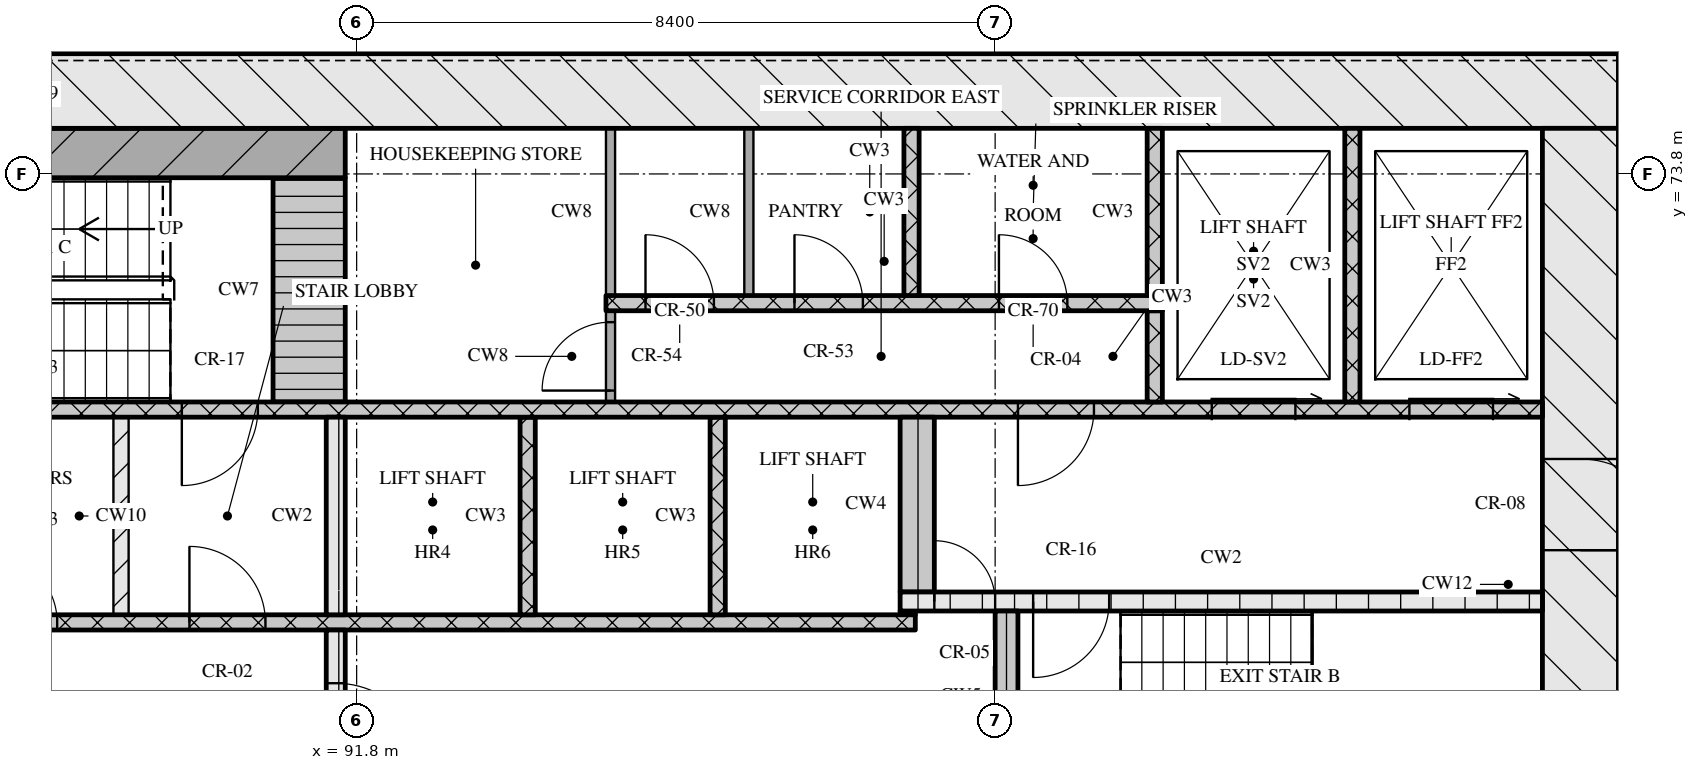
"""IFC4 building model, lengths in metres.
Left out: names, types, materials, properties, quantities, classifications, styles, units other than length and angle.
Written with IfcOpenShell. Run it as: python <this file> out.ifc"""

import sys

from ifc_helpers import new_model, si_unit, direction, frame, frame_2d, origin, place, context, subcontext, project, spatial, rectangle, extrude, element, fill, save


model = new_model("IFC4")
c1 = context("Model", 3, precision=1e-05, world=origin(), true_north=direction((0.0, 1.0)))
c2 = subcontext(c1, "Body", "Model", "MODEL_VIEW")
j1 = project(units=[si_unit("LENGTHUNIT", "METRE"), si_unit("PLANEANGLEUNIT", "RADIAN")], contexts=[c1])
p1 = place(None, origin())
s1 = spatial("IfcSite", under=j1, at=p1, CompositionType="ELEMENT")
p2 = place(p1, origin())
s2 = spatial("IfcBuilding", under=s1, at=p2, CompositionType="ELEMENT")
p3 = place(p2, frame((0.0, 0.0, 116.85)))
s3 = spatial("IfcBuildingStorey", under=s2, at=p3, CompositionType="ELEMENT", Elevation=116.85)
p4 = place(p3, frame((66.8, 74.9, 0.0), z_axis=(0.0, 0.0, 1.0), x_axis=(1.0, 0.0, 0.0)))
e1 = element("IfcWall", 1, at=p4, inside=s3, PredefinedType="SOLIDWALL", context=c2, shape_type="SweptSolid", body=[
    extrude(rectangle(XDim=41.6, YDim=1.0, at=frame_2d((20.8, 0.0))), origin(), (0.0, 0.0, 1.0), 3.32),
])
p5 = place(p3, frame((107.9, 62.4, 0.0), z_axis=(0.0, 0.0, 1.0), x_axis=(0.0, 1.0, 0.0)))
e2 = element("IfcWall", 2, at=p5, inside=s3, PredefinedType="SOLIDWALL", context=c2, shape_type="SweptSolid", body=[
    extrude(rectangle(XDim=12.0, YDim=1.0, at=frame_2d((6.0, 0.0))), origin(), (0.0, 0.0, 1.0), 3.32),
])
p6 = place(p5, frame((6.45, 0.0, 0.0)))
e3 = element("IfcOpeningElement", 3, at=p6, cuts=e2, PredefinedType="OPENING", context=c2, shape_type="SweptSolid", body=[
    extrude(rectangle(XDim=1.2, YDim=2.1, at=frame_2d((0.6, 1.05))), frame((0.0, 0.51, 0.0), z_axis=(0.0, -1.0, 0.0), x_axis=(1.0, 0.0, 0.0)), (0.0, 0.0, 1.0), 1.02),
])
p7 = place(p3, frame((91.525, 65.2, 0.0), z_axis=(0.0, 0.0, 1.0), x_axis=(0.0, 1.0, 0.0)))
e4 = element("IfcWall", 4, at=p7, inside=s3, PredefinedType="SOLIDWALL", context=c2, shape_type="SweptSolid", body=[
    extrude(rectangle(XDim=2.6, YDim=0.25, at=frame_2d((1.3, 0.0))), origin(), (0.0, 0.0, 1.0), 3.32),
])
p8 = place(p7, frame((0.7, 0.0, 0.0)))
e5 = element("IfcOpeningElement", 5, at=p8, cuts=e4, PredefinedType="OPENING", context=c2, shape_type="SweptSolid", body=[
    extrude(rectangle(XDim=1.2, YDim=2.1, at=frame_2d((0.6, 1.05))), frame((0.0, 0.135, 0.0), z_axis=(0.0, -1.0, 0.0), x_axis=(1.0, 0.0, 0.0)), (0.0, 0.0, 1.0), 0.27),
])
p9 = place(p3, frame((100.35, 65.2, 0.0), z_axis=(0.0, 0.0, 1.0), x_axis=(0.0, 1.0, 0.0)))
e6 = element("IfcWall", 6, at=p9, inside=s3, PredefinedType="SOLIDWALL", context=c2, shape_type="SweptSolid", body=[
    extrude(rectangle(XDim=2.85, YDim=0.3, at=frame_2d((1.425, 0.0))), origin(), (0.0, 0.0, 1.0), 3.32),
])
p10 = place(p3, frame((76.05, 67.9, 0.0), z_axis=(0.0, 0.0, 1.0), x_axis=(1.0, 0.0, 0.0)))
e7 = element("IfcWall", 7, at=p10, inside=s3, PredefinedType="SOLIDWALL", context=c2, shape_type="SweptSolid", body=[
    extrude(rectangle(XDim=23.1, YDim=0.2, at=frame_2d((11.55, 0.0))), origin(), (0.0, 0.0, 1.0), 3.32),
])
p11 = place(p10, frame((0.6, 0.0, 0.0)))
e8 = element("IfcOpeningElement", 8, at=p11, cuts=e7, PredefinedType="OPENING", context=c2, shape_type="SweptSolid", body=[
    extrude(rectangle(XDim=1.1, YDim=2.1, at=frame_2d((0.55, 1.05))), frame((0.0, 0.11, 0.0), z_axis=(0.0, -1.0, 0.0), x_axis=(1.0, 0.0, 0.0)), (0.0, 0.0, 1.0), 0.22),
])
p12 = place(p10, frame((3.1, 0.0, 0.0)))
e9 = element("IfcOpeningElement", 9, at=p12, cuts=e7, PredefinedType="OPENING", context=c2, shape_type="SweptSolid", body=[
    extrude(rectangle(XDim=1.1, YDim=2.1, at=frame_2d((0.55, 1.05))), frame((0.0, 0.11, 0.0), z_axis=(0.0, -1.0, 0.0), x_axis=(1.0, 0.0, 0.0)), (0.0, 0.0, 1.0), 0.22),
])
p13 = place(p10, frame((5.6, 0.0, 0.0)))
e10 = element("IfcOpeningElement", 10, at=p13, cuts=e7, PredefinedType="OPENING", context=c2, shape_type="SweptSolid", body=[
    extrude(rectangle(XDim=1.1, YDim=2.1, at=frame_2d((0.55, 1.05))), frame((0.0, 0.11, 0.0), z_axis=(0.0, -1.0, 0.0), x_axis=(1.0, 0.0, 0.0)), (0.0, 0.0, 1.0), 0.22),
])
p14 = place(p10, frame((8.45, 0.0, 0.0)))
e11 = element("IfcOpeningElement", 11, at=p14, cuts=e7, PredefinedType="OPENING", context=c2, shape_type="SweptSolid", body=[
    extrude(rectangle(XDim=0.9, YDim=2.1, at=frame_2d((0.45, 1.05))), frame((0.0, 0.11, 0.0), z_axis=(0.0, -1.0, 0.0), x_axis=(1.0, 0.0, 0.0)), (0.0, 0.0, 1.0), 0.22),
])
p15 = place(p10, frame((10.91, 0.0, 0.0)))
e12 = element("IfcOpeningElement", 12, at=p15, cuts=e7, PredefinedType="OPENING", context=c2, shape_type="SweptSolid", body=[
    extrude(rectangle(XDim=0.9, YDim=2.1, at=frame_2d((0.45, 1.05))), frame((0.0, 0.11, 0.0), z_axis=(0.0, -1.0, 0.0), x_axis=(1.0, 0.0, 0.0)), (0.0, 0.0, 1.0), 0.22),
])
p16 = place(p10, frame((13.55, 0.0, 0.0)))
e13 = element("IfcOpeningElement", 13, at=p16, cuts=e7, PredefinedType="OPENING", context=c2, shape_type="SweptSolid", body=[
    extrude(rectangle(XDim=1.0, YDim=2.1, at=frame_2d((0.5, 1.05))), frame((0.0, 0.11, 0.0), z_axis=(0.0, -1.0, 0.0), x_axis=(1.0, 0.0, 0.0)), (0.0, 0.0, 1.0), 0.22),
])
p17 = place(p3, frame((88.7, 68.0, 0.0), z_axis=(0.0, 0.0, 1.0), x_axis=(0.0, 1.0, 0.0)))
e14 = element("IfcWall", 14, at=p17, inside=s3, PredefinedType="PARTITIONING", context=c2, shape_type="SweptSolid", body=[
    extrude(rectangle(XDim=2.6, YDim=0.2, at=frame_2d((1.3, 0.0))), origin(), (0.0, 0.0, 1.0), 3.32),
])
p18 = place(p3, frame((91.525, 68.0, 0.0), z_axis=(0.0, 0.0, 1.0), x_axis=(0.0, 1.0, 0.0)))
e15 = element("IfcWall", 15, at=p18, inside=s3, PredefinedType="SOLIDWALL", context=c2, shape_type="SweptSolid", body=[
    extrude(rectangle(XDim=2.6, YDim=0.25, at=frame_2d((1.3, 0.0))), origin(), (0.0, 0.0, 1.0), 3.32),
])
for number, where, z_axis, x_axis in (
    (16, (94.05, 68.0, 0.0), (0.0, 0.0, 1.0), (0.0, 1.0, 0.0)),
    (17, (96.55, 68.0, 0.0), (0.0, 0.0, 1.0), (0.0, 1.0, 0.0)),
):
    element("IfcWall", number, at=place(p3, frame(where, z_axis=z_axis, x_axis=x_axis)), inside=s3, PredefinedType="SOLIDWALL", context=c2, shape_type="SweptSolid", body=[
        extrude(rectangle(XDim=2.6, YDim=0.2, at=frame_2d((1.3, 0.0))), origin(), (0.0, 0.0, 1.0), 3.32),
    ])
p19 = place(p3, frame((98.95, 68.025, 0.0), z_axis=(0.0, 0.0, 1.0), x_axis=(1.0, 0.0, 0.0)))
e18 = element("IfcWall", 18, at=p19, inside=s3, PredefinedType="SOLIDWALL", context=c2, shape_type="SweptSolid", body=[
    extrude(rectangle(XDim=0.2, YDim=0.05, at=frame_2d((0.1, 0.0))), origin(), (0.0, 0.0, 1.0), 3.32),
])
p20 = place(p3, frame((98.95, 68.175, 0.0), z_axis=(0.0, 0.0, 1.0), x_axis=(1.0, 0.0, 0.0)))
e19 = element("IfcWall", 19, at=p20, inside=s3, PredefinedType="SOLIDWALL", context=c2, shape_type="SweptSolid", body=[
    extrude(rectangle(XDim=8.45, YDim=0.25, at=frame_2d((4.225, 0.0))), origin(), (0.0, 0.0, 1.0), 3.32),
])
p21 = place(p20, frame((0.45, 0.0, 0.0)))
e20 = element("IfcOpeningElement", 20, at=p21, cuts=e19, PredefinedType="OPENING", context=c2, shape_type="SweptSolid", body=[
    extrude(rectangle(XDim=0.8, YDim=2.1, at=frame_2d((0.4, 1.05))), frame((0.0, 0.135, 0.0), z_axis=(0.0, -1.0, 0.0), x_axis=(1.0, 0.0, 0.0)), (0.0, 0.0, 1.0), 0.27),
])
p22 = place(p20, frame((1.75, 0.0, 0.0)))
e21 = element("IfcOpeningElement", 21, at=p22, cuts=e19, PredefinedType="OPENING", context=c2, shape_type="SweptSolid", body=[
    extrude(rectangle(XDim=1.0, YDim=2.1, at=frame_2d((0.5, 1.05))), frame((0.0, 0.135, 0.0), z_axis=(0.0, -1.0, 0.0), x_axis=(1.0, 0.0, 0.0)), (0.0, 0.0, 1.0), 0.27),
])
p23 = place(p3, frame((99.175, 68.3, 0.0), z_axis=(0.0, 0.0, 1.0), x_axis=(0.0, 1.0, 0.0)))
e22 = element("IfcWall", 22, at=p23, inside=s3, PredefinedType="SOLIDWALL", context=c2, shape_type="SweptSolid", body=[
    extrude(rectangle(XDim=2.3, YDim=0.45, at=frame_2d((1.15, 0.0))), origin(), (0.0, 0.0, 1.0), 3.32),
])
p24 = place(p3, frame((67.8, 70.7, 0.0), z_axis=(0.0, 0.0, 1.0), x_axis=(1.0, 0.0, 0.0)))
e23 = element("IfcWall", 23, at=p24, inside=s3, PredefinedType="SOLIDWALL", context=c2, shape_type="SweptSolid", body=[
    extrude(rectangle(XDim=39.6, YDim=0.2, at=frame_2d((19.8, 0.0))), origin(), (0.0, 0.0, 1.0), 3.32),
])
p25 = place(p24, frame((0.65, 0.0, 0.0)))
e24 = element("IfcOpeningElement", 24, at=p25, cuts=e23, PredefinedType="OPENING", context=c2, shape_type="SweptSolid", body=[
    extrude(rectangle(XDim=1.1, YDim=2.1, at=frame_2d((0.55, 1.05))), frame((0.0, 0.11, 0.0), z_axis=(0.0, -1.0, 0.0), x_axis=(1.0, 0.0, 0.0)), (0.0, 0.0, 1.0), 0.22),
])
p26 = place(p24, frame((3.25, 0.0, 0.0)))
e25 = element("IfcOpeningElement", 25, at=p26, cuts=e23, PredefinedType="OPENING", context=c2, shape_type="SweptSolid", body=[
    extrude(rectangle(XDim=1.1, YDim=2.1, at=frame_2d((0.55, 1.05))), frame((0.0, 0.11, 0.0), z_axis=(0.0, -1.0, 0.0), x_axis=(1.0, 0.0, 0.0)), (0.0, 0.0, 1.0), 0.22),
])
p27 = place(p24, frame((5.9, 0.0, 0.0)))
e26 = element("IfcOpeningElement", 26, at=p27, cuts=e23, PredefinedType="OPENING", context=c2, shape_type="SweptSolid", body=[
    extrude(rectangle(XDim=1.0, YDim=2.1, at=frame_2d((0.5, 1.05))), frame((0.0, 0.11, 0.0), z_axis=(0.0, -1.0, 0.0), x_axis=(1.0, 0.0, 0.0)), (0.0, 0.0, 1.0), 0.22),
])
p28 = place(p24, frame((21.7, 0.0, 0.0)))
e27 = element("IfcOpeningElement", 27, at=p28, cuts=e23, PredefinedType="OPENING", context=c2, shape_type="SweptSolid", body=[
    extrude(rectangle(XDim=1.0, YDim=2.1, at=frame_2d((0.5, 1.05))), frame((0.0, 0.11, 0.0), z_axis=(0.0, -1.0, 0.0), x_axis=(1.0, 0.0, 0.0)), (0.0, 0.0, 1.0), 0.22),
])
p29 = place(p24, frame((32.7, 0.0, 0.0)))
e28 = element("IfcOpeningElement", 28, at=p29, cuts=e23, PredefinedType="OPENING", context=c2, shape_type="SweptSolid", body=[
    extrude(rectangle(XDim=1.0, YDim=2.1, at=frame_2d((0.5, 1.05))), frame((0.0, 0.11, 0.0), z_axis=(0.0, -1.0, 0.0), x_axis=(1.0, 0.0, 0.0)), (0.0, 0.0, 1.0), 0.22),
])
p30 = place(p24, frame((35.25, 0.0, 0.0)))
e29 = element("IfcOpeningElement", 29, at=p30, cuts=e23, PredefinedType="OPENING", context=c2, shape_type="SweptSolid", body=[
    extrude(rectangle(XDim=1.1, YDim=2.1, at=frame_2d((0.55, 1.05))), frame((0.0, 0.11, 0.0), z_axis=(0.0, -1.0, 0.0), x_axis=(1.0, 0.0, 0.0)), (0.0, 0.0, 1.0), 0.22),
])
p31 = place(p24, frame((37.85, 0.0, 0.0)))
e30 = element("IfcOpeningElement", 30, at=p31, cuts=e23, PredefinedType="OPENING", context=c2, shape_type="SweptSolid", body=[
    extrude(rectangle(XDim=1.1, YDim=2.1, at=frame_2d((0.55, 1.05))), frame((0.0, 0.11, 0.0), z_axis=(0.0, -1.0, 0.0), x_axis=(1.0, 0.0, 0.0)), (0.0, 0.0, 1.0), 0.22),
])
p32 = place(p3, frame((91.175, 70.8, 0.0), z_axis=(0.0, 0.0, 1.0), x_axis=(0.0, 1.0, 0.0)))
e31 = element("IfcWall", 31, at=p32, inside=s3, PredefinedType="SOLIDWALL", context=c2, shape_type="SweptSolid", body=[
    extrude(rectangle(XDim=2.95, YDim=0.95, at=frame_2d((1.475, 0.0))), origin(), (0.0, 0.0, 1.0), 3.32),
])
p33 = place(p3, frame((95.14, 70.8, 0.0), z_axis=(0.0, 0.0, 1.0), x_axis=(0.0, 1.0, 0.0)))
e32 = element("IfcWall", 32, at=p33, inside=s3, PredefinedType="PARTITIONING", context=c2, shape_type="SweptSolid", body=[
    extrude(rectangle(XDim=1.2, YDim=0.12, at=frame_2d((0.6, 0.0))), origin(), (0.0, 0.0, 1.0), 3.32),
])
p34 = place(p33, frame((0.15, 0.0, 0.0)))
e33 = element("IfcOpeningElement", 33, at=p34, cuts=e32, PredefinedType="OPENING", context=c2, shape_type="SweptSolid", body=[
    extrude(rectangle(XDim=0.9, YDim=2.1, at=frame_2d((0.45, 1.05))), frame((0.0, 0.07, 0.0), z_axis=(0.0, -1.0, 0.0), x_axis=(1.0, 0.0, 0.0)), (0.0, 0.0, 1.0), 0.14),
])
p35 = place(p3, frame((102.3, 70.8, 0.0), z_axis=(0.0, 0.0, 1.0), x_axis=(0.0, 1.0, 0.0)))
e34 = element("IfcWall", 34, at=p35, inside=s3, PredefinedType="SOLIDWALL", context=c2, shape_type="SweptSolid", body=[
    extrude(rectangle(XDim=1.2, YDim=0.2, at=frame_2d((0.6, 0.0))), origin(), (0.0, 0.0, 1.0), 3.32),
])
p36 = place(p3, frame((104.9, 70.8, 0.0), z_axis=(0.0, 0.0, 1.0), x_axis=(0.0, 1.0, 0.0)))
e35 = element("IfcWall", 35, at=p36, inside=s3, PredefinedType="SOLIDWALL", context=c2, shape_type="SweptSolid", body=[
    extrude(rectangle(XDim=3.6, YDim=0.2, at=frame_2d((1.8, 0.0))), origin(), (0.0, 0.0, 1.0), 3.32),
])
p37 = place(p3, frame((95.08, 72.1, 0.0), z_axis=(0.0, 0.0, 1.0), x_axis=(1.0, 0.0, 0.0)))
e36 = element("IfcWall", 36, at=p37, inside=s3, PredefinedType="SOLIDWALL", context=c2, shape_type="SweptSolid", body=[
    extrude(rectangle(XDim=7.32, YDim=0.2, at=frame_2d((3.66, 0.0))), origin(), (0.0, 0.0, 1.0), 3.32),
])
p38 = place(p37, frame((0.52, 0.0, 0.0)))
e37 = element("IfcOpeningElement", 37, at=p38, cuts=e36, PredefinedType="OPENING", context=c2, shape_type="SweptSolid", body=[
    extrude(rectangle(XDim=0.9, YDim=2.1, at=frame_2d((0.45, 1.05))), frame((0.0, 0.11, 0.0), z_axis=(0.0, -1.0, 0.0), x_axis=(1.0, 0.0, 0.0)), (0.0, 0.0, 1.0), 0.22),
])
p39 = place(p37, frame((2.48, 0.0, 0.0)))
e38 = element("IfcOpeningElement", 38, at=p39, cuts=e36, PredefinedType="OPENING", context=c2, shape_type="SweptSolid", body=[
    extrude(rectangle(XDim=0.9, YDim=2.1, at=frame_2d((0.45, 1.05))), frame((0.0, 0.11, 0.0), z_axis=(0.0, -1.0, 0.0), x_axis=(1.0, 0.0, 0.0)), (0.0, 0.0, 1.0), 0.22),
])
p40 = place(p37, frame((5.17, 0.0, 0.0)))
e39 = element("IfcOpeningElement", 39, at=p40, cuts=e36, PredefinedType="OPENING", context=c2, shape_type="SweptSolid", body=[
    extrude(rectangle(XDim=0.9, YDim=2.1, at=frame_2d((0.45, 1.05))), frame((0.0, 0.11, 0.0), z_axis=(0.0, -1.0, 0.0), x_axis=(1.0, 0.0, 0.0)), (0.0, 0.0, 1.0), 0.22),
])
for number, where, z_axis, x_axis in (
    (40, (95.14, 72.2, 0.0), (0.0, 0.0, 1.0), (0.0, 1.0, 0.0)),
    (41, (96.96, 72.2, 0.0), (0.0, 0.0, 1.0), (0.0, 1.0, 0.0)),
):
    element("IfcWall", number, at=place(p3, frame(where, z_axis=z_axis, x_axis=x_axis)), inside=s3, PredefinedType="PARTITIONING", context=c2, shape_type="SweptSolid", body=[
        extrude(rectangle(XDim=2.2, YDim=0.12, at=frame_2d((1.1, 0.0))), origin(), (0.0, 0.0, 1.0), 3.32),
    ])
for number, where, z_axis, x_axis in (
    (42, (99.1, 72.2, 0.0), (0.0, 0.0, 1.0), (0.0, 1.0, 0.0)),
    (43, (102.3, 72.2, 0.0), (0.0, 0.0, 1.0), (0.0, 1.0, 0.0)),
):
    element("IfcWall", number, at=place(p3, frame(where, z_axis=z_axis, x_axis=x_axis)), inside=s3, PredefinedType="SOLIDWALL", context=c2, shape_type="SweptSolid", body=[
        extrude(rectangle(XDim=2.2, YDim=0.2, at=frame_2d((1.1, 0.0))), origin(), (0.0, 0.0, 1.0), 3.32),
    ])
p41 = place(p3, frame((83.55, 74.075, 0.0), z_axis=(0.0, 0.0, 1.0), x_axis=(1.0, 0.0, 0.0)))
e44 = element("IfcWall", 44, at=p41, inside=s3, PredefinedType="SOLIDWALL", context=c2, shape_type="SweptSolid", body=[
    extrude(rectangle(XDim=8.1, YDim=0.65, at=frame_2d((4.05, 0.0))), origin(), (0.0, 0.0, 1.0), 3.32),
])
p42 = place(p8, origin())
e45 = element("IfcDoor", 45, at=p42, inside=s3, OperationType="SINGLE_SWING_RIGHT", PredefinedType="DOOR", context=c2, shape_type="SweptSolid", body=[
    extrude(rectangle(XDim=1.2, YDim=2.1, at=frame_2d((0.6, 1.05))), frame((0.0, 0.025, 0.0), z_axis=(0.0, -1.0, 0.0), x_axis=(1.0, 0.0, 0.0)), (0.0, 0.0, 1.0), 0.05),
])
fill(e5, e45)
p43 = place(p15, origin())
e46 = element("IfcDoor", 46, at=p43, inside=s3, OperationType="SINGLE_SWING_LEFT", PredefinedType="DOOR", context=c2, shape_type="SweptSolid", body=[
    extrude(rectangle(XDim=0.9, YDim=2.1, at=frame_2d((0.45, 1.05))), frame((0.0, 0.025, 0.0), z_axis=(0.0, -1.0, 0.0), x_axis=(1.0, 0.0, 0.0)), (0.0, 0.0, 1.0), 0.05),
])
fill(e12, e46)
p44 = place(p16, origin())
e47 = element("IfcDoor", 47, at=p44, inside=s3, OperationType="SINGLE_SWING_LEFT", PredefinedType="DOOR", context=c2, shape_type="SweptSolid", body=[
    extrude(rectangle(XDim=1.0, YDim=2.1, at=frame_2d((0.5, 1.05))), frame((0.0, 0.025, 0.0), z_axis=(0.0, -1.0, 0.0), x_axis=(1.0, 0.0, 0.0)), (0.0, 0.0, 1.0), 0.05),
])
fill(e13, e47)
p45 = place(p21, origin())
e48 = element("IfcDoor", 48, at=p45, inside=s3, OperationType="SINGLE_SWING_LEFT", PredefinedType="DOOR", context=c2, shape_type="SweptSolid", body=[
    extrude(rectangle(XDim=0.8, YDim=2.1, at=frame_2d((0.4, 1.05))), frame((0.0, 0.025, 0.0), z_axis=(0.0, -1.0, 0.0), x_axis=(1.0, 0.0, 0.0)), (0.0, 0.0, 1.0), 0.05),
])
fill(e20, e48)
p46 = place(p22, origin())
e49 = element("IfcDoor", 49, at=p46, inside=s3, OperationType="SINGLE_SWING_RIGHT", PredefinedType="DOOR", context=c2, shape_type="SweptSolid", body=[
    extrude(rectangle(XDim=1.0, YDim=2.1, at=frame_2d((0.5, 1.05))), frame((0.0, 0.025, 0.0), z_axis=(0.0, -1.0, 0.0), x_axis=(1.0, 0.0, 0.0)), (0.0, 0.0, 1.0), 0.05),
])
fill(e21, e49)
p47 = place(p6, origin())
e50 = element("IfcDoor", 50, at=p47, inside=s3, OperationType="SINGLE_SWING_RIGHT", PredefinedType="DOOR", context=c2, shape_type="SweptSolid", body=[
    extrude(rectangle(XDim=1.2, YDim=2.1, at=frame_2d((0.6, 1.05))), frame((0.0, 0.025, 0.0), z_axis=(0.0, -1.0, 0.0), x_axis=(1.0, 0.0, 0.0)), (0.0, 0.0, 1.0), 0.05),
])
fill(e3, e50)
p48 = place(p28, origin())
e51 = element("IfcDoor", 51, at=p48, inside=s3, OperationType="SINGLE_SWING_RIGHT", PredefinedType="DOOR", context=c2, shape_type="SweptSolid", body=[
    extrude(rectangle(XDim=1.0, YDim=2.1, at=frame_2d((0.5, 1.05))), frame((0.0, 0.025, 0.0), z_axis=(0.0, -1.0, 0.0), x_axis=(1.0, 0.0, 0.0)), (0.0, 0.0, 1.0), 0.05),
])
fill(e27, e51)
p49 = place(p29, origin())
e52 = element("IfcDoor", 52, at=p49, inside=s3, OperationType="SINGLE_SWING_RIGHT", PredefinedType="DOOR", context=c2, shape_type="SweptSolid", body=[
    extrude(rectangle(XDim=1.0, YDim=2.1, at=frame_2d((0.5, 1.05))), frame((0.0, 0.025, 0.0), z_axis=(0.0, -1.0, 0.0), x_axis=(1.0, 0.0, 0.0)), (0.0, 0.0, 1.0), 0.05),
])
fill(e28, e52)
p50 = place(p30, origin())
e53 = element("IfcDoor", 53, at=p50, inside=s3, OperationType="SLIDING_TO_RIGHT", PredefinedType="DOOR", context=c2, shape_type="SweptSolid", body=[
    extrude(rectangle(XDim=1.1, YDim=2.1, at=frame_2d((0.55, 1.05))), frame((0.0, 0.025, 0.0), z_axis=(0.0, -1.0, 0.0), x_axis=(1.0, 0.0, 0.0)), (0.0, 0.0, 1.0), 0.05),
])
fill(e29, e53)
p51 = place(p31, origin())
e54 = element("IfcDoor", 54, at=p51, inside=s3, OperationType="SLIDING_TO_RIGHT", PredefinedType="DOOR", context=c2, shape_type="SweptSolid", body=[
    extrude(rectangle(XDim=1.1, YDim=2.1, at=frame_2d((0.55, 1.05))), frame((0.0, 0.025, 0.0), z_axis=(0.0, -1.0, 0.0), x_axis=(1.0, 0.0, 0.0)), (0.0, 0.0, 1.0), 0.05),
])
fill(e30, e54)
p52 = place(p34, origin())
e55 = element("IfcDoor", 55, at=p52, inside=s3, OperationType="SINGLE_SWING_LEFT", PredefinedType="DOOR", context=c2, shape_type="SweptSolid", body=[
    extrude(rectangle(XDim=0.9, YDim=2.1, at=frame_2d((0.45, 1.05))), frame((0.0, 0.025, 0.0), z_axis=(0.0, -1.0, 0.0), x_axis=(1.0, 0.0, 0.0)), (0.0, 0.0, 1.0), 0.05),
])
fill(e33, e55)
p53 = place(p38, origin())
e56 = element("IfcDoor", 56, at=p53, inside=s3, OperationType="SINGLE_SWING_LEFT", PredefinedType="DOOR", context=c2, shape_type="SweptSolid", body=[
    extrude(rectangle(XDim=0.9, YDim=2.1, at=frame_2d((0.45, 1.05))), frame((0.0, 0.025, 0.0), z_axis=(0.0, -1.0, 0.0), x_axis=(1.0, 0.0, 0.0)), (0.0, 0.0, 1.0), 0.05),
])
fill(e37, e56)
p54 = place(p39, origin())
e57 = element("IfcDoor", 57, at=p54, inside=s3, OperationType="SINGLE_SWING_LEFT", PredefinedType="DOOR", context=c2, shape_type="SweptSolid", body=[
    extrude(rectangle(XDim=0.9, YDim=2.1, at=frame_2d((0.45, 1.05))), frame((0.0, 0.025, 0.0), z_axis=(0.0, -1.0, 0.0), x_axis=(1.0, 0.0, 0.0)), (0.0, 0.0, 1.0), 0.05),
])
fill(e38, e57)
p55 = place(p40, origin())
e58 = element("IfcDoor", 58, at=p55, inside=s3, OperationType="SINGLE_SWING_LEFT", PredefinedType="DOOR", context=c2, shape_type="SweptSolid", body=[
    extrude(rectangle(XDim=0.9, YDim=2.1, at=frame_2d((0.45, 1.05))), frame((0.0, 0.025, 0.0), z_axis=(0.0, -1.0, 0.0), x_axis=(1.0, 0.0, 0.0)), (0.0, 0.0, 1.0), 0.05),
])
fill(e39, e58)
save(model, sys.argv[1])
